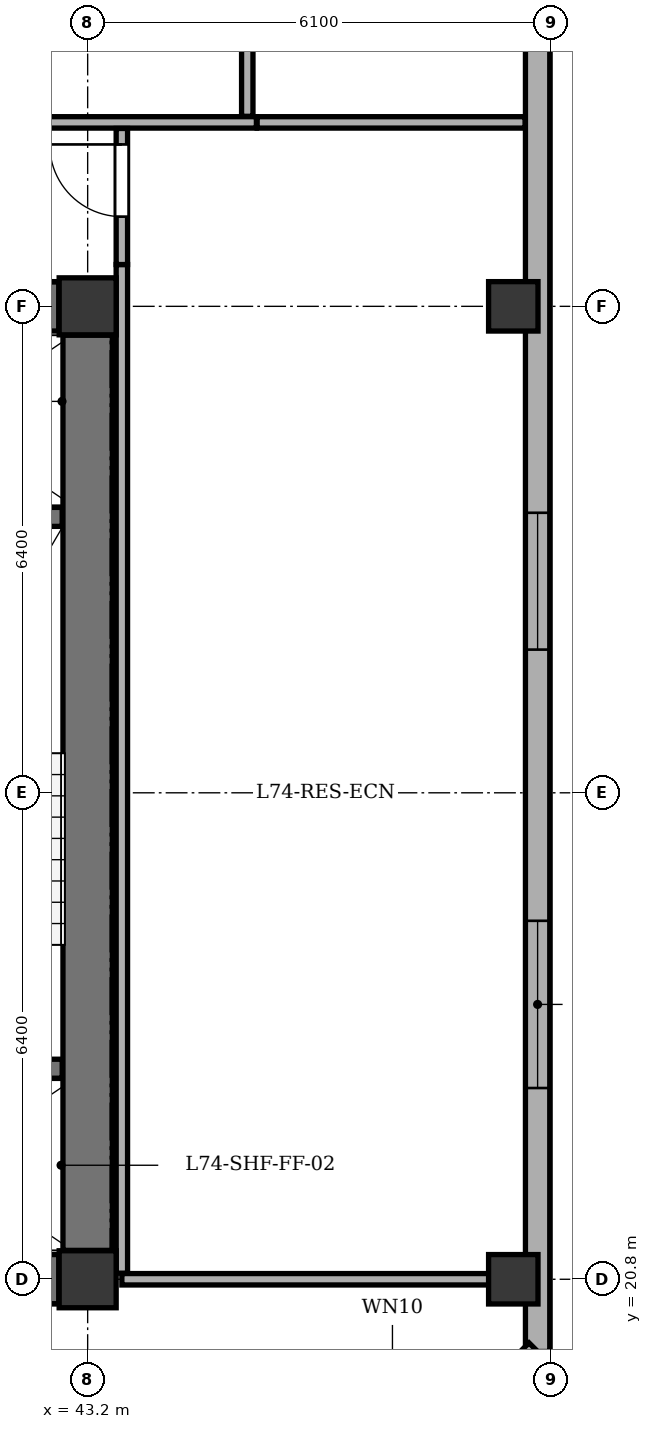
"""IFC4 building model, lengths in metres.
Left out: names, types, materials, properties, quantities, classifications, styles, units other than length and angle.
Written with IfcOpenShell. Run it as: python <this file> out.ifc"""

import sys

from ifc_helpers import new_model, si_unit, direction, frame, frame_2d, origin, origin_2d, place, context, subcontext, project, spatial, rectangle, extrude, element, fill, save


model = new_model("IFC4")
c1 = context("Model", 3, precision=1e-05, world=origin(), true_north=direction((0.0, 1.0)))
c2 = subcontext(c1, "Body", "Model", "MODEL_VIEW")
j1 = project(units=[si_unit("LENGTHUNIT", "METRE"), si_unit("PLANEANGLEUNIT", "RADIAN")], contexts=[c1])
p1 = place(None, origin())
s1 = spatial("IfcSite", under=j1, at=p1, CompositionType="ELEMENT")
p2 = place(p1, origin())
s2 = spatial("IfcBuilding", under=s1, at=p2, CompositionType="ELEMENT")
p3 = place(p2, frame((0.0, 0.0, 278.9)))
s3 = spatial("IfcBuildingStorey", under=s2, at=p3, CompositionType="ELEMENT", Elevation=278.9)
for number, where, z_axis, x_axis in (
    (1, (43.2, 20.8, 0.0), (0.0, 0.0, 1.0), (1.0, 0.0, 0.0)),
    (2, (43.2, 33.6, 0.0), (0.0, 0.0, 1.0), (1.0, 0.0, 0.0)),
):
    element("IfcColumn", number, at=place(p3, frame(where, z_axis=z_axis, x_axis=x_axis)), inside=s3, PredefinedType="COLUMN", context=c2, shape_type="SweptSolid", body=[
        extrude(rectangle(XDim=0.75, YDim=0.75, at=origin_2d()), origin(), (0.0, 0.0, 1.0), 3.4),
    ])
for number, where, z_axis, x_axis in (
    (3, (48.8, 20.8, 0.0), (0.0, 0.0, 1.0), (1.0, 0.0, 0.0)),
    (4, (48.8, 33.6, 0.0), (0.0, 0.0, 1.0), (1.0, 0.0, 0.0)),
):
    element("IfcColumn", number, at=place(p3, frame(where, z_axis=z_axis, x_axis=x_axis)), inside=s3, PredefinedType="COLUMN", context=c2, shape_type="SweptSolid", body=[
        extrude(rectangle(XDim=0.65, YDim=0.65, at=origin_2d()), origin(), (0.0, 0.0, 1.0), 3.4),
    ])
p4 = place(p3, frame((49.12, 41.1, 0.0), z_axis=(0.0, 0.0, 1.0), x_axis=(0.0, -1.0, 0.0)))
e5 = element("IfcWall", 5, at=p4, inside=s3, PredefinedType="STANDARD", context=c2, shape_type="SweptSolid", body=[
    extrude(rectangle(XDim=21.25, YDim=0.32, at=frame_2d((10.625, 0.0))), origin(), (0.0, 0.0, 1.0), 2.575),
])
p5 = place(p4, frame((1.74, 0.0, 0.75)))
e6 = element("IfcOpeningElement", 6, at=p5, cuts=e5, PredefinedType="OPENING", context=c2, shape_type="SweptSolid", body=[
    extrude(rectangle(XDim=1.8, YDim=1.7, at=frame_2d((0.9, 0.85))), frame((0.0, 0.17, 0.0), z_axis=(0.0, -1.0, 0.0), x_axis=(1.0, 0.0, 0.0)), (0.0, 0.0, 1.0), 0.34),
])
p6 = place(p4, frame((10.216, 0.0, 0.75)))
e7 = element("IfcOpeningElement", 7, at=p6, cuts=e5, PredefinedType="OPENING", context=c2, shape_type="SweptSolid", body=[
    extrude(rectangle(XDim=1.8, YDim=1.7, at=frame_2d((0.9, 0.85))), frame((0.0, 0.17, 0.0), z_axis=(0.0, -1.0, 0.0), x_axis=(1.0, 0.0, 0.0)), (0.0, 0.0, 1.0), 0.34),
])
p7 = place(p4, frame((15.584, 0.0, 0.75)))
e8 = element("IfcOpeningElement", 8, at=p7, cuts=e5, PredefinedType="OPENING", context=c2, shape_type="SweptSolid", body=[
    extrude(rectangle(XDim=2.2, YDim=1.7, at=frame_2d((1.1, 0.85))), frame((0.0, 0.17, 0.0), z_axis=(0.0, -1.0, 0.0), x_axis=(1.0, 0.0, 0.0)), (0.0, 0.0, 1.0), 0.34),
])
p8 = place(p3, frame((49.12, 19.85, 0.0), z_axis=(0.0, 0.0, 1.0), x_axis=(-0.707106781187, -0.707106781187, 0.0)))
e9 = element("IfcWall", 9, at=p8, inside=s3, PredefinedType="STANDARD", context=c2, shape_type="SweptSolid", body=[
    extrude(rectangle(XDim=5.402, YDim=0.32, at=frame_2d((2.701, 0.0))), origin(), (0.0, 0.0, 1.0), 2.575),
])
p9 = place(p8, frame((2.001, 0.0, 0.75)))
e10 = element("IfcOpeningElement", 10, at=p9, cuts=e9, PredefinedType="OPENING", context=c2, shape_type="SweptSolid", body=[
    extrude(rectangle(XDim=1.4, YDim=1.65, at=frame_2d((0.7, 0.825))), frame((0.0, 0.17, 0.0), z_axis=(0.0, -1.0, 0.0), x_axis=(1.0, 0.0, 0.0)), (0.0, 0.0, 1.0), 0.34),
])
p10 = place(p3, frame((43.2, 21.18, 0.0), z_axis=(0.0, 0.0, 1.0), x_axis=(0.0, 1.0, 0.0)))
e11 = element("IfcWall", 11, at=p10, inside=s3, PredefinedType="SHEAR", context=c2, shape_type="SweptSolid", body=[
    extrude(rectangle(XDim=12.04, YDim=0.65, at=frame_2d((6.02, 0.0))), origin(), (0.0, 0.0, 1.0), 2.95),
])
p11 = place(p3, frame((35.58, 20.8, 0.0), z_axis=(0.0, 0.0, 1.0), x_axis=(1.0, 0.0, 0.0)))
e12 = element("IfcWall", 12, at=p11, inside=s3, PredefinedType="SHEAR", context=c2, shape_type="SweptSolid", body=[
    extrude(rectangle(XDim=7.24, YDim=0.65, at=frame_2d((3.62, 0.0))), origin(), (0.0, 0.0, 1.0), 2.95),
])
p12 = place(p3, frame((35.58, 33.6, 0.0), z_axis=(0.0, 0.0, 1.0), x_axis=(1.0, 0.0, 0.0)))
e13 = element("IfcWall", 13, at=p12, inside=s3, PredefinedType="SHEAR", context=c2, shape_type="SweptSolid", body=[
    extrude(rectangle(XDim=7.24, YDim=0.65, at=frame_2d((3.62, 0.0))), origin(), (0.0, 0.0, 1.0), 2.95),
])
p13 = place(p12, frame((4.82, 0.0, 0.0)))
e14 = element("IfcOpeningElement", 14, at=p13, cuts=e13, PredefinedType="OPENING", context=c2, shape_type="SweptSolid", body=[
    extrude(rectangle(XDim=1.3, YDim=2.15, at=frame_2d((0.65, 1.075))), frame((0.0, 0.335, 0.0), z_axis=(0.0, -1.0, 0.0), x_axis=(1.0, 0.0, 0.0)), (0.0, 0.0, 1.0), 0.67),
])
p14 = place(p12, frame((2.62, 0.0, 0.0)))
e15 = element("IfcOpeningElement", 15, at=p14, cuts=e13, PredefinedType="OPENING", context=c2, shape_type="SweptSolid", body=[
    extrude(rectangle(XDim=0.85, YDim=2.02, at=frame_2d((0.425, 1.01))), frame((0.0, 0.335, 0.0), z_axis=(0.0, -1.0, 0.0), x_axis=(1.0, 0.0, 0.0)), (0.0, 0.0, 1.0), 0.67),
])
for number, where, z_axis, x_axis in (
    (16, (39.69, 23.57, 0.0), (0.0, 0.0, 1.0), (1.0, 0.0, 0.0)),
    (17, (39.69, 30.83, 0.0), (0.0, 0.0, 1.0), (1.0, 0.0, 0.0)),
):
    element("IfcWall", number, at=place(p3, frame(where, z_axis=z_axis, x_axis=x_axis)), inside=s3, PredefinedType="SHEAR", context=c2, shape_type="SweptSolid", body=[
        extrude(rectangle(XDim=3.175, YDim=0.25, at=frame_2d((1.587, 0.0))), origin(), (0.0, 0.0, 1.0), 2.95),
    ])
p15 = place(p3, frame((10.9, 36.02, 0.0), z_axis=(0.0, 0.0, 1.0), x_axis=(1.0, 0.0, 0.0)))
e18 = element("IfcWall", 18, at=p15, inside=s3, PredefinedType="PARTITIONING", context=c2, shape_type="SweptSolid", body=[
    extrude(rectangle(XDim=34.52, YDim=0.15, at=frame_2d((17.26, 0.0))), origin(), (0.0, 0.0, 1.0), 2.95),
])
p16 = place(p15, frame((16.76, 0.0, 0.0)))
e19 = element("IfcOpeningElement", 19, at=p16, cuts=e18, PredefinedType="OPENING", context=c2, shape_type="SweptSolid", body=[
    extrude(rectangle(XDim=1.0, YDim=2.1, at=frame_2d((0.5, 1.05))), frame((0.0, 0.085, 0.0), z_axis=(0.0, -1.0, 0.0), x_axis=(1.0, 0.0, 0.0)), (0.0, 0.0, 1.0), 0.17),
])
p17 = place(p3, frame((45.3, 36.1, 0.0), z_axis=(0.0, 0.0, 1.0), x_axis=(0.0, 1.0, 0.0)))
e20 = element("IfcWall", 20, at=p17, inside=s3, PredefinedType="PARTITIONING", context=c2, shape_type="SweptSolid", body=[
    extrude(rectangle(XDim=8.655, YDim=0.15, at=frame_2d((4.327, 0.0))), origin(), (0.0, 0.0, 1.0), 2.95),
])
p18 = place(p3, frame((43.65, 20.8, 0.0), z_axis=(0.0, 0.0, 1.0), x_axis=(1.0, 0.0, 0.0)))
e21 = element("IfcWall", 21, at=p18, inside=s3, PredefinedType="PARTITIONING", context=c2, shape_type="SweptSolid", body=[
    extrude(rectangle(XDim=5.305, YDim=0.15, at=frame_2d((2.653, 0.0))), origin(), (0.0, 0.0, 1.0), 2.385),
])
p19 = place(p3, frame((45.43, 36.02, 0.0), z_axis=(0.0, 0.0, 1.0), x_axis=(1.0, 0.0, 0.0)))
e22 = element("IfcWall", 22, at=p19, inside=s3, PredefinedType="PARTITIONING", context=c2, shape_type="SweptSolid", body=[
    extrude(rectangle(XDim=3.525, YDim=0.15, at=frame_2d((1.763, 0.0))), origin(), (0.0, 0.0, 1.0), 2.95),
])
p20 = place(p3, frame((43.65, 20.88, 0.0), z_axis=(0.0, 0.0, 1.0), x_axis=(0.0, 1.0, 0.0)))
e23 = element("IfcWall", 23, at=p20, inside=s3, PredefinedType="PARTITIONING", context=c2, shape_type="SweptSolid", body=[
    extrude(rectangle(XDim=13.27, YDim=0.15, at=frame_2d((6.635, 0.0))), origin(), (0.0, 0.0, 1.0), 2.95),
])
p21 = place(p3, frame((43.65, 34.15, 0.0), z_axis=(0.0, 0.0, 1.0), x_axis=(0.0, 1.0, 0.0)))
e24 = element("IfcWall", 24, at=p21, inside=s3, PredefinedType="PARTITIONING", context=c2, shape_type="SweptSolid", body=[
    extrude(rectangle(XDim=1.79, YDim=0.15, at=frame_2d((0.895, 0.0))), origin(), (0.0, 0.0, 1.0), 2.95),
])
p22 = place(p21, frame((0.63, 0.0, 0.0)))
e25 = element("IfcOpeningElement", 25, at=p22, cuts=e24, PredefinedType="OPENING", context=c2, shape_type="SweptSolid", body=[
    extrude(rectangle(XDim=0.95, YDim=2.1, at=frame_2d((0.475, 1.05))), frame((0.0, 0.085, 0.0), z_axis=(0.0, -1.0, 0.0), x_axis=(1.0, 0.0, 0.0)), (0.0, 0.0, 1.0), 0.17),
])
p23 = place(p6, origin())
e26 = element("IfcWindow", 26, at=p23, inside=s3, PartitioningType="SINGLE_PANEL", PredefinedType="WINDOW", context=c2, shape_type="SweptSolid", body=[
    extrude(rectangle(XDim=1.8, YDim=1.7, at=frame_2d((0.9, 0.85))), frame((0.0, -0.01, 0.0), z_axis=(0.0, -1.0, 0.0), x_axis=(1.0, 0.0, 0.0)), (0.0, 0.0, 1.0), 0.06),
])
fill(e7, e26)
p24 = place(p7, origin())
e27 = element("IfcWindow", 27, at=p24, inside=s3, PartitioningType="SINGLE_PANEL", PredefinedType="WINDOW", context=c2, shape_type="SweptSolid", body=[
    extrude(rectangle(XDim=2.2, YDim=1.7, at=frame_2d((1.1, 0.85))), frame((0.0, -0.01, 0.0), z_axis=(0.0, -1.0, 0.0), x_axis=(1.0, 0.0, 0.0)), (0.0, 0.0, 1.0), 0.06),
])
fill(e8, e27)
p25 = place(p22, origin())
e28 = element("IfcDoor", 28, at=p25, inside=s3, OperationType="SINGLE_SWING_RIGHT", PredefinedType="DOOR", context=c2, shape_type="SweptSolid", body=[
    extrude(rectangle(XDim=0.95, YDim=2.1, at=frame_2d((0.475, 1.05))), frame((0.0, 0.025, 0.0), z_axis=(0.0, -1.0, 0.0), x_axis=(1.0, 0.0, 0.0)), (0.0, 0.0, 1.0), 0.05),
])
fill(e25, e28)
save(model, sys.argv[1])
